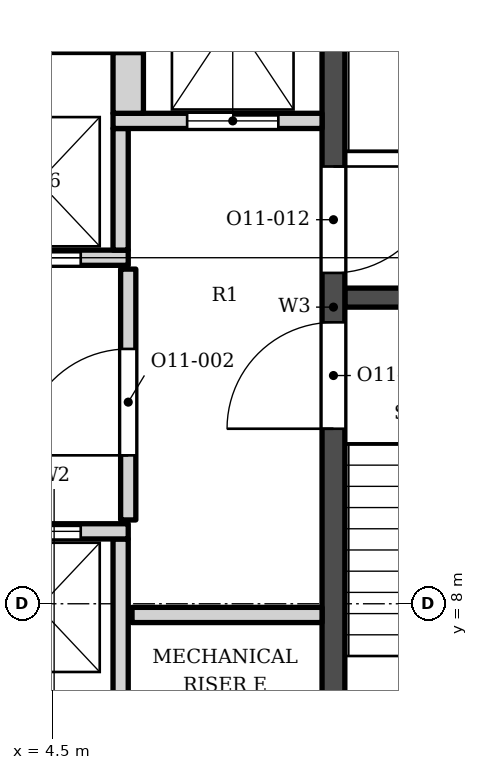
"""IFC4 building model, lengths in metres.
Left out: names, types, materials, properties, quantities, classifications, styles, units other than length and angle.
Written with IfcOpenShell. Run it as: python <this file> out.ifc"""

import sys

from ifc_helpers import new_model, si_unit, direction, frame, frame_2d, origin, place, context, subcontext, project, spatial, rectangle, extrude, element, fill, save


model = new_model("IFC4")
c1 = context("Model", 3, precision=1e-05, world=origin(), true_north=direction((0.0, 1.0)))
c2 = subcontext(c1, "Body", "Model", "MODEL_VIEW")
j1 = project(units=[si_unit("LENGTHUNIT", "METRE"), si_unit("PLANEANGLEUNIT", "RADIAN")], contexts=[c1])
p1 = place(None, origin())
s1 = spatial("IfcSite", under=j1, at=p1, CompositionType="ELEMENT")
p2 = place(p1, origin())
s2 = spatial("IfcBuilding", under=s1, at=p2, CompositionType="ELEMENT")
p3 = place(p2, frame((0.0, 0.0, 271.6)))
s3 = spatial("IfcBuildingStorey", under=s2, at=p3, CompositionType="ELEMENT", Elevation=271.6)
p4 = place(p3, frame((8.2, 5.253, 0.0), z_axis=(0.0, 0.0, 1.0), x_axis=(0.0, 1.0, 0.0)))
e1 = element("IfcWall", 1, at=p4, inside=s3, PredefinedType="SHEAR", context=c2, shape_type="SweptSolid", body=[
    extrude(rectangle(XDim=13.3, YDim=0.3, at=frame_2d((6.65, 0.0))), origin(), (0.0, 0.0, 1.0), 3.9),
])
p5 = place(p4, frame((7.1, 0.0, 0.0)))
e2 = element("IfcOpeningElement", 2, at=p5, cuts=e1, PredefinedType="OPENING", context=c2, shape_type="SweptSolid", body=[
    extrude(rectangle(XDim=1.4, YDim=2.1, at=frame_2d((0.7, 1.05))), frame((0.0, 0.16, 0.0), z_axis=(0.0, -1.0, 0.0), x_axis=(1.0, 0.0, 0.0)), (0.0, 0.0, 1.0), 0.32),
])
p6 = place(p4, frame((5.05, 0.0, 0.0)))
e3 = element("IfcOpeningElement", 3, at=p6, cuts=e1, PredefinedType="OPENING", context=c2, shape_type="SweptSolid", body=[
    extrude(rectangle(XDim=1.4, YDim=2.1, at=frame_2d((0.7, 1.05))), frame((0.0, 0.16, 0.0), z_axis=(0.0, -1.0, 0.0), x_axis=(1.0, 0.0, 0.0)), (0.0, 0.0, 1.0), 0.32),
])
p7 = place(p3, frame((8.35, 12.028, 0.0), z_axis=(0.0, 0.0, 1.0), x_axis=(1.0, 0.0, 0.0)))
e4 = element("IfcWall", 4, at=p7, inside=s3, PredefinedType="SHEAR", context=c2, shape_type="SweptSolid", body=[
    extrude(rectangle(XDim=3.75, YDim=0.25, at=frame_2d((1.875, 0.0))), origin(), (0.0, 0.0, 1.0), 3.9),
])
for number, where, z_axis, x_axis in (
    (5, (5.4, 6.353, 0.0), (0.0, 0.0, 1.0), (0.0, 1.0, 0.0)),
    (6, (5.55, 7.853, 0.0), (0.0, 0.0, 1.0), (1.0, 0.0, 0.0)),
):
    element("IfcWall", number, at=place(p3, frame(where, z_axis=z_axis, x_axis=x_axis)), inside=s3, PredefinedType="SOLIDWALL", context=c2, shape_type="SweptSolid", body=[
        extrude(rectangle(XDim=2.5, YDim=0.2, at=frame_2d((1.25, 0.0))), origin(), (0.0, 0.0, 1.0), 3.73),
    ])
p8 = place(p3, frame((1.0, 8.953, 0.0), z_axis=(0.0, 0.0, 1.0), x_axis=(1.0, 0.0, 0.0)))
e7 = element("IfcWall", 7, at=p8, inside=s3, PredefinedType="SOLIDWALL", context=c2, shape_type="SweptSolid", body=[
    extrude(rectangle(XDim=4.5, YDim=0.2, at=frame_2d((2.25, 0.0))), origin(), (0.0, 0.0, 1.0), 3.73),
])
p9 = place(p8, frame((0.625, 0.0, 0.0)))
e8 = element("IfcOpeningElement", 8, at=p9, cuts=e7, PredefinedType="OPENING", context=c2, shape_type="SweptSolid", body=[
    extrude(rectangle(XDim=1.1, YDim=2.1, at=frame_2d((0.55, 1.05))), frame((0.0, 0.11, 0.0), z_axis=(0.0, -1.0, 0.0), x_axis=(1.0, 0.0, 0.0)), (0.0, 0.0, 1.0), 0.22),
])
p10 = place(p8, frame((2.775, 0.0, 0.0)))
e9 = element("IfcOpeningElement", 9, at=p10, cuts=e7, PredefinedType="OPENING", context=c2, shape_type="SweptSolid", body=[
    extrude(rectangle(XDim=1.1, YDim=2.1, at=frame_2d((0.55, 1.05))), frame((0.0, 0.11, 0.0), z_axis=(0.0, -1.0, 0.0), x_axis=(1.0, 0.0, 0.0)), (0.0, 0.0, 1.0), 0.22),
])
p11 = place(p3, frame((5.5, 9.103, 0.0), z_axis=(0.0, 0.0, 1.0), x_axis=(0.0, 1.0, 0.0)))
e10 = element("IfcWall", 10, at=p11, inside=s3, PredefinedType="SOLIDWALL", context=c2, shape_type="SweptSolid", body=[
    extrude(rectangle(XDim=3.3, YDim=0.2, at=frame_2d((1.65, 0.0))), origin(), (0.0, 0.0, 1.0), 3.73),
])
p12 = place(p11, frame((0.85, 0.0, 0.0)))
e11 = element("IfcOpeningElement", 11, at=p12, cuts=e10, PredefinedType="OPENING", context=c2, shape_type="SweptSolid", body=[
    extrude(rectangle(XDim=1.4, YDim=2.1, at=frame_2d((0.7, 1.05))), frame((0.0, 0.11, 0.0), z_axis=(0.0, -1.0, 0.0), x_axis=(1.0, 0.0, 0.0)), (0.0, 0.0, 1.0), 0.22),
])
p13 = place(p3, frame((-1.5, 12.552, 0.0), z_axis=(0.0, 0.0, 1.0), x_axis=(1.0, 0.0, 0.0)))
e12 = element("IfcWall", 12, at=p13, inside=s3, PredefinedType="SOLIDWALL", context=c2, shape_type="SweptSolid", body=[
    extrude(rectangle(XDim=7.0, YDim=0.2, at=frame_2d((3.5, 0.0))), origin(), (0.0, 0.0, 1.0), 3.73),
])
p14 = place(p13, frame((3.075, 0.0, 0.0)))
e13 = element("IfcOpeningElement", 13, at=p14, cuts=e12, PredefinedType="OPENING", context=c2, shape_type="SweptSolid", body=[
    extrude(rectangle(XDim=1.1, YDim=2.1, at=frame_2d((0.55, 1.05))), frame((0.0, 0.11, 0.0), z_axis=(0.0, -1.0, 0.0), x_axis=(1.0, 0.0, 0.0)), (0.0, 0.0, 1.0), 0.22),
])
p15 = place(p13, frame((5.275, 0.0, 0.0)))
e14 = element("IfcOpeningElement", 14, at=p15, cuts=e12, PredefinedType="OPENING", context=c2, shape_type="SweptSolid", body=[
    extrude(rectangle(XDim=1.1, YDim=2.1, at=frame_2d((0.55, 1.05))), frame((0.0, 0.11, 0.0), z_axis=(0.0, -1.0, 0.0), x_axis=(1.0, 0.0, 0.0)), (0.0, 0.0, 1.0), 0.22),
])
p16 = place(p3, frame((5.4, 12.653, 0.0), z_axis=(0.0, 0.0, 1.0), x_axis=(0.0, 1.0, 0.0)))
e15 = element("IfcWall", 15, at=p16, inside=s3, PredefinedType="SOLIDWALL", context=c2, shape_type="SweptSolid", body=[
    extrude(rectangle(XDim=1.6, YDim=0.2, at=frame_2d((0.8, 0.0))), origin(), (0.0, 0.0, 1.0), 3.73),
])
p17 = place(p3, frame((5.3, 14.353, 0.0), z_axis=(0.0, 0.0, 1.0), x_axis=(1.0, 0.0, 0.0)))
e16 = element("IfcWall", 16, at=p17, inside=s3, PredefinedType="SOLIDWALL", context=c2, shape_type="SweptSolid", body=[
    extrude(rectangle(XDim=2.75, YDim=0.2, at=frame_2d((1.375, 0.0))), origin(), (0.0, 0.0, 1.0), 3.73),
])
p18 = place(p17, frame((0.975, 0.0, 0.0)))
e17 = element("IfcOpeningElement", 17, at=p18, cuts=e16, PredefinedType="OPENING", context=c2, shape_type="SweptSolid", body=[
    extrude(rectangle(XDim=1.2, YDim=2.1, at=frame_2d((0.6, 1.05))), frame((0.0, 0.11, 0.0), z_axis=(0.0, -1.0, 0.0), x_axis=(1.0, 0.0, 0.0)), (0.0, 0.0, 1.0), 0.22),
])
p19 = place(p3, frame((5.5, 14.453, 0.0), z_axis=(0.0, 0.0, 1.0), x_axis=(0.0, 1.0, 0.0)))
e18 = element("IfcWall", 18, at=p19, inside=s3, PredefinedType="SOLIDWALL", context=c2, shape_type="SweptSolid", body=[
    extrude(rectangle(XDim=0.8, YDim=0.4, at=frame_2d((0.4, 0.0))), origin(), (0.0, 0.0, 1.0), 3.73),
])
p20 = place(p3, frame((-1.5, 15.353, 0.0), z_axis=(0.0, 0.0, 1.0), x_axis=(1.0, 0.0, 0.0)))
e19 = element("IfcWall", 19, at=p20, inside=s3, PredefinedType="SOLIDWALL", context=c2, shape_type="SweptSolid", body=[
    extrude(rectangle(XDim=7.2, YDim=0.2, at=frame_2d((3.6, 0.0))), origin(), (0.0, 0.0, 1.0), 3.73),
])
p21 = place(p10, origin())
e20 = element("IfcDoor", 20, at=p21, inside=s3, OperationType="DOUBLE_DOOR_SLIDING", PredefinedType="DOOR", context=c2, shape_type="SweptSolid", body=[
    extrude(rectangle(XDim=1.1, YDim=2.1, at=frame_2d((0.55, 1.05))), frame((0.0, 0.025, 0.0), z_axis=(0.0, -1.0, 0.0), x_axis=(1.0, 0.0, 0.0)), (0.0, 0.0, 1.0), 0.05),
])
fill(e9, e20)
p22 = place(p15, origin())
e21 = element("IfcDoor", 21, at=p22, inside=s3, OperationType="DOUBLE_DOOR_SLIDING", PredefinedType="DOOR", context=c2, shape_type="SweptSolid", body=[
    extrude(rectangle(XDim=1.1, YDim=2.1, at=frame_2d((0.55, 1.05))), frame((0.0, 0.025, 0.0), z_axis=(0.0, -1.0, 0.0), x_axis=(1.0, 0.0, 0.0)), (0.0, 0.0, 1.0), 0.05),
])
fill(e14, e21)
p23 = place(p18, origin())
e22 = element("IfcDoor", 22, at=p23, inside=s3, OperationType="DOUBLE_DOOR_SLIDING", PredefinedType="DOOR", context=c2, shape_type="SweptSolid", body=[
    extrude(rectangle(XDim=1.2, YDim=2.1, at=frame_2d((0.6, 1.05))), frame((0.0, 0.025, 0.0), z_axis=(0.0, -1.0, 0.0), x_axis=(1.0, 0.0, 0.0)), (0.0, 0.0, 1.0), 0.05),
])
fill(e17, e22)
p24 = place(p5, origin())
e23 = element("IfcDoor", 23, at=p24, inside=s3, OperationType="SINGLE_SWING_RIGHT", PredefinedType="DOOR", context=c2, shape_type="SweptSolid", body=[
    extrude(rectangle(XDim=1.4, YDim=2.1, at=frame_2d((0.7, 1.05))), frame((0.0, 0.025, 0.0), z_axis=(0.0, -1.0, 0.0), x_axis=(1.0, 0.0, 0.0)), (0.0, 0.0, 1.0), 0.05),
])
fill(e2, e23)
p25 = place(p6, origin())
e24 = element("IfcDoor", 24, at=p25, inside=s3, OperationType="SINGLE_SWING_LEFT", PredefinedType="DOOR", context=c2, shape_type="SweptSolid", body=[
    extrude(rectangle(XDim=1.4, YDim=2.1, at=frame_2d((0.7, 1.05))), frame((0.0, 0.025, 0.0), z_axis=(0.0, -1.0, 0.0), x_axis=(1.0, 0.0, 0.0)), (0.0, 0.0, 1.0), 0.05),
])
fill(e3, e24)
p26 = place(p12, origin())
e25 = element("IfcDoor", 25, at=p26, inside=s3, OperationType="SINGLE_SWING_LEFT", PredefinedType="DOOR", context=c2, shape_type="SweptSolid", body=[
    extrude(rectangle(XDim=1.4, YDim=2.1, at=frame_2d((0.7, 1.05))), frame((0.0, 0.025, 0.0), z_axis=(0.0, -1.0, 0.0), x_axis=(1.0, 0.0, 0.0)), (0.0, 0.0, 1.0), 0.05),
])
fill(e11, e25)
save(model, sys.argv[1])
